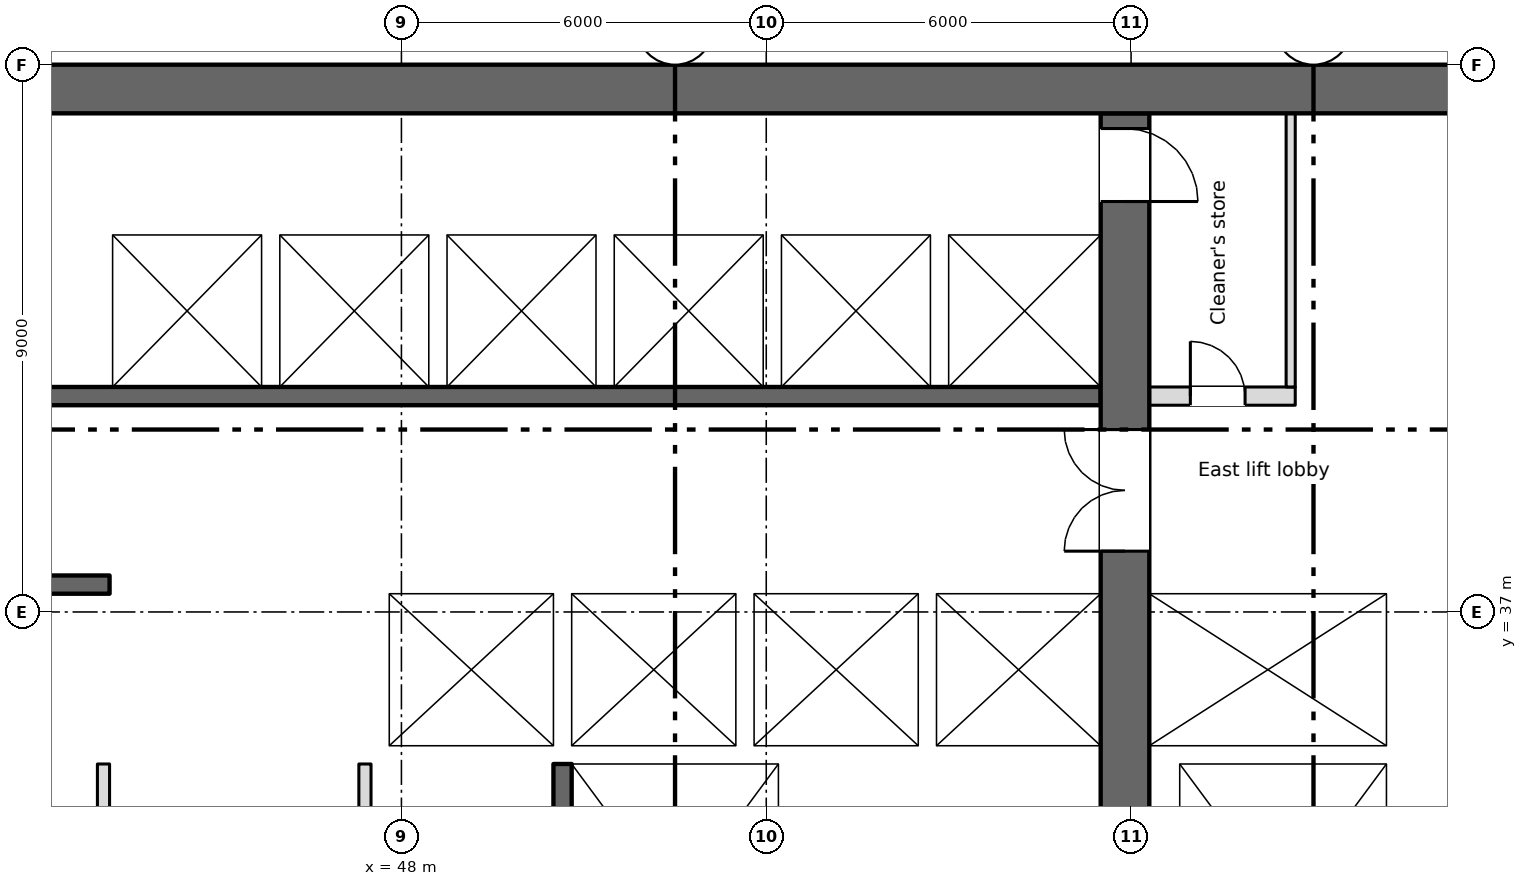
"""IFC4 building model, lengths in metres.
Left out: names, types, materials, properties, quantities, classifications, styles, units other than length and angle.
Written with IfcOpenShell. Run it as: python <this file> out.ifc"""

import sys

from ifc_helpers import new_model, si_unit, direction, frame, frame_2d, origin, place, context, subcontext, project, spatial, rectangle, extrude, element, fill, save


model = new_model("IFC4")
c1 = context("Model", 3, precision=1e-05, world=origin(), true_north=direction((0.0, 1.0)))
c2 = subcontext(c1, "Body", "Model", "MODEL_VIEW")
j1 = project(units=[si_unit("LENGTHUNIT", "METRE"), si_unit("PLANEANGLEUNIT", "RADIAN")], contexts=[c1])
p1 = place(None, origin())
s1 = spatial("IfcSite", under=j1, at=p1, CompositionType="ELEMENT")
p2 = place(p1, origin())
s2 = spatial("IfcBuilding", under=s1, at=p2, CompositionType="ELEMENT")
p3 = place(p2, frame((0.0, 0.0, 113.75)))
s3 = spatial("IfcBuildingStorey", under=s2, at=p3, CompositionType="ELEMENT", Elevation=113.75)
p4 = place(p3, frame((5.55, 45.6, 0.0), z_axis=(0.0, 0.0, 1.0), x_axis=(1.0, 0.0, 0.0)))
e1 = element("IfcWall", 1, at=p4, inside=s3, PredefinedType="SHEAR", context=c2, shape_type="SweptSolid", body=[
    extrude(rectangle(XDim=60.9, YDim=0.8, at=frame_2d((30.45, 0.0))), origin(), (0.0, 0.0, 1.0), 3.35),
])
p5 = place(p4, frame((1.2, 0.0, 0.6)))
e2 = element("IfcOpeningElement", 2, at=p5, cuts=e1, PredefinedType="OPENING", context=c2, shape_type="SweptSolid", body=[
    extrude(rectangle(XDim=0.6, YDim=2.4, at=frame_2d((0.3, 1.2))), frame((0.0, 0.41, 0.0), z_axis=(0.0, -1.0, 0.0), x_axis=(1.0, 0.0, 0.0)), (0.0, 0.0, 1.0), 0.82),
])
p6 = place(p4, frame((7.2, 0.0, 0.6)))
e3 = element("IfcOpeningElement", 3, at=p6, cuts=e1, PredefinedType="OPENING", context=c2, shape_type="SweptSolid", body=[
    extrude(rectangle(XDim=0.6, YDim=2.4, at=frame_2d((0.3, 1.2))), frame((0.0, 0.41, 0.0), z_axis=(0.0, -1.0, 0.0), x_axis=(1.0, 0.0, 0.0)), (0.0, 0.0, 1.0), 0.82),
])
p7 = place(p3, frame((64.35, 34.8, 0.0), z_axis=(0.0, 0.0, 1.0), x_axis=(0.0, 1.0, 0.0)))
e4 = element("IfcWall", 4, at=p7, inside=s3, PredefinedType="SHEAR", context=c2, shape_type="SweptSolid", body=[
    extrude(rectangle(XDim=10.4, YDim=0.3, at=frame_2d((5.2, 0.0))), origin(), (0.0, 0.0, 1.0), 3.35),
])
p8 = place(p3, frame((59.9, 28.4, 0.0), z_axis=(0.0, 0.0, 1.0), x_axis=(0.0, 1.0, 0.0)))
e5 = element("IfcWall", 5, at=p8, inside=s3, PredefinedType="SHEAR", context=c2, shape_type="SweptSolid", body=[
    extrude(rectangle(XDim=16.8, YDim=0.8, at=frame_2d((8.4, 0.0))), origin(), (0.0, 0.0, 1.0), 3.35),
])
p9 = place(p8, frame((9.6, 0.0, 0.0)))
e6 = element("IfcOpeningElement", 6, at=p9, cuts=e5, PredefinedType="OPENING", context=c2, shape_type="SweptSolid", body=[
    extrude(rectangle(XDim=2.0, YDim=2.1, at=frame_2d((1.0, 1.05))), frame((0.0, 0.41, 0.0), z_axis=(0.0, -1.0, 0.0), x_axis=(1.0, 0.0, 0.0)), (0.0, 0.0, 1.0), 0.82),
])
p10 = place(p8, frame((15.35, 0.0, 0.0)))
e7 = element("IfcOpeningElement", 7, at=p10, cuts=e5, PredefinedType="OPENING", context=c2, shape_type="SweptSolid", body=[
    extrude(rectangle(XDim=1.2, YDim=2.1, at=frame_2d((0.6, 1.05))), frame((0.0, 0.41, 0.0), z_axis=(0.0, -1.0, 0.0), x_axis=(1.0, 0.0, 0.0)), (0.0, 0.0, 1.0), 0.82),
])
p11 = place(p3, frame((50.65, 34.5, 0.0), z_axis=(0.0, 0.0, 1.0), x_axis=(0.0, -1.0, 0.0)))
e8 = element("IfcWall", 8, at=p11, inside=s3, PredefinedType="SHEAR", context=c2, shape_type="SweptSolid", body=[
    extrude(rectangle(XDim=6.1, YDim=0.3, at=frame_2d((3.05, 0.0))), origin(), (0.0, 0.0, 1.0), 3.35),
])
p12 = place(p11, frame((4.95, 0.0, 0.0)))
e9 = element("IfcOpeningElement", 9, at=p12, cuts=e8, PredefinedType="OPENING", context=c2, shape_type="SweptSolid", body=[
    extrude(rectangle(XDim=1.1, YDim=2.1, at=frame_2d((0.55, 1.05))), frame((0.0, 0.16, 0.0), z_axis=(0.0, -1.0, 0.0), x_axis=(1.0, 0.0, 0.0)), (0.0, 0.0, 1.0), 0.32),
])
p13 = place(p3, frame((54.35, 28.4, 0.0), z_axis=(0.0, 0.0, 1.0), x_axis=(0.0, 1.0, 0.0)))
e10 = element("IfcWall", 10, at=p13, inside=s3, PredefinedType="SHEAR", context=c2, shape_type="SweptSolid", body=[
    extrude(rectangle(XDim=6.1, YDim=0.3, at=frame_2d((3.05, 0.0))), origin(), (0.0, 0.0, 1.0), 3.35),
])
p14 = place(p3, frame((60.55, 28.4, 0.0), z_axis=(0.0, 0.0, 1.0), x_axis=(0.0, 1.0, 0.0)))
e11 = element("IfcWall", 11, at=p14, inside=s3, PredefinedType="SHEAR", context=c2, shape_type="SweptSolid", body=[
    extrude(rectangle(XDim=6.1, YDim=0.5, at=frame_2d((3.05, 0.0))), origin(), (0.0, 0.0, 1.0), 3.35),
])
p15 = place(p3, frame((64.35, 28.4, 0.0), z_axis=(0.0, 0.0, 1.0), x_axis=(0.0, 1.0, 0.0)))
e12 = element("IfcWall", 12, at=p15, inside=s3, PredefinedType="SHEAR", context=c2, shape_type="SweptSolid", body=[
    extrude(rectangle(XDim=6.1, YDim=0.3, at=frame_2d((3.05, 0.0))), origin(), (0.0, 0.0, 1.0), 3.35),
])
p16 = place(p3, frame((34.8, 34.65, 0.0), z_axis=(0.0, 0.0, 1.0), x_axis=(1.0, 0.0, 0.0)))
e13 = element("IfcWall", 13, at=p16, inside=s3, PredefinedType="SHEAR", context=c2, shape_type="SweptSolid", body=[
    extrude(rectangle(XDim=8.4, YDim=0.3, at=frame_2d((4.2, 0.0))), origin(), (0.0, 0.0, 1.0), 3.35),
])
p17 = place(p3, frame((47.3, 34.65, 0.0), z_axis=(0.0, 0.0, 1.0), x_axis=(1.0, 0.0, 0.0)))
e14 = element("IfcWall", 14, at=p17, inside=s3, PredefinedType="SHEAR", context=c2, shape_type="SweptSolid", body=[
    extrude(rectangle(XDim=12.2, YDim=0.3, at=frame_2d((6.1, 0.0))), origin(), (0.0, 0.0, 1.0), 3.35),
])
p18 = place(p17, frame((1.3, 0.0, 0.0)))
e15 = element("IfcOpeningElement", 15, at=p18, cuts=e14, PredefinedType="OPENING", context=c2, shape_type="SweptSolid", body=[
    extrude(rectangle(XDim=1.1, YDim=2.1, at=frame_2d((0.55, 1.05))), frame((0.0, 0.16, 0.0), z_axis=(0.0, -1.0, 0.0), x_axis=(1.0, 0.0, 0.0)), (0.0, 0.0, 1.0), 0.32),
])
p19 = place(p3, frame((60.3, 34.65, 0.0), z_axis=(0.0, 0.0, 1.0), x_axis=(1.0, 0.0, 0.0)))
e16 = element("IfcWall", 16, at=p19, inside=s3, PredefinedType="SHEAR", context=c2, shape_type="SweptSolid", body=[
    extrude(rectangle(XDim=4.2, YDim=0.3, at=frame_2d((2.1, 0.0))), origin(), (0.0, 0.0, 1.0), 3.35),
])
p20 = place(p3, frame((43.2, 37.45, 0.0), z_axis=(0.0, 0.0, 1.0), x_axis=(-1.0, 0.0, 0.0)))
e17 = element("IfcWall", 17, at=p20, inside=s3, PredefinedType="SHEAR", context=c2, shape_type="SweptSolid", body=[
    extrude(rectangle(XDim=8.4, YDim=0.3, at=frame_2d((4.2, 0.0))), origin(), (0.0, 0.0, 1.0), 3.35),
])
p21 = place(p20, frame((3.75, 0.0, 0.0)))
e18 = element("IfcOpeningElement", 18, at=p21, cuts=e17, PredefinedType="OPENING", context=c2, shape_type="SweptSolid", body=[
    extrude(rectangle(XDim=0.9, YDim=2.1, at=frame_2d((0.45, 1.05))), frame((0.0, 0.16, 0.0), z_axis=(0.0, -1.0, 0.0), x_axis=(1.0, 0.0, 0.0)), (0.0, 0.0, 1.0), 0.32),
])
p22 = place(p3, frame((47.3, 37.45, 0.0), z_axis=(0.0, 0.0, 1.0), x_axis=(1.0, 0.0, 0.0)))
e19 = element("IfcWall", 19, at=p22, inside=s3, PredefinedType="SHEAR", context=c2, shape_type="SweptSolid", body=[
    extrude(rectangle(XDim=12.2, YDim=0.3, at=frame_2d((6.1, 0.0))), origin(), (0.0, 0.0, 1.0), 3.35),
])
p23 = place(p22, frame((4.3, 0.0, 0.0)))
e20 = element("IfcOpeningElement", 20, at=p23, cuts=e19, PredefinedType="OPENING", context=c2, shape_type="SweptSolid", body=[
    extrude(rectangle(XDim=1.1, YDim=2.1, at=frame_2d((0.55, 1.05))), frame((0.0, 0.16, 0.0), z_axis=(0.0, -1.0, 0.0), x_axis=(1.0, 0.0, 0.0)), (0.0, 0.0, 1.0), 0.32),
])
p24 = place(p22, frame((7.3, 0.0, 0.0)))
e21 = element("IfcOpeningElement", 21, at=p24, cuts=e19, PredefinedType="OPENING", context=c2, shape_type="SweptSolid", body=[
    extrude(rectangle(XDim=1.1, YDim=2.1, at=frame_2d((0.55, 1.05))), frame((0.0, 0.16, 0.0), z_axis=(0.0, -1.0, 0.0), x_axis=(1.0, 0.0, 0.0)), (0.0, 0.0, 1.0), 0.32),
])
p25 = place(p22, frame((10.3, 0.0, 0.0)))
e22 = element("IfcOpeningElement", 22, at=p25, cuts=e19, PredefinedType="OPENING", context=c2, shape_type="SweptSolid", body=[
    extrude(rectangle(XDim=1.1, YDim=2.1, at=frame_2d((0.55, 1.05))), frame((0.0, 0.16, 0.0), z_axis=(0.0, -1.0, 0.0), x_axis=(1.0, 0.0, 0.0)), (0.0, 0.0, 1.0), 0.32),
])
p26 = place(p3, frame((60.3, 37.45, 0.0), z_axis=(0.0, 0.0, 1.0), x_axis=(1.0, 0.0, 0.0)))
e23 = element("IfcWall", 23, at=p26, inside=s3, PredefinedType="SHEAR", context=c2, shape_type="SweptSolid", body=[
    extrude(rectangle(XDim=3.9, YDim=0.3, at=frame_2d((1.95, 0.0))), origin(), (0.0, 0.0, 1.0), 3.35),
])
p27 = place(p26, frame((1.4, 0.0, 0.0)))
e24 = element("IfcOpeningElement", 24, at=p27, cuts=e23, PredefinedType="OPENING", context=c2, shape_type="SweptSolid", body=[
    extrude(rectangle(XDim=1.1, YDim=2.1, at=frame_2d((0.55, 1.05))), frame((0.0, 0.16, 0.0), z_axis=(0.0, -1.0, 0.0), x_axis=(1.0, 0.0, 0.0)), (0.0, 0.0, 1.0), 0.32),
])
p28 = place(p3, frame((43.05, 34.8, 0.0), z_axis=(0.0, 0.0, 1.0), x_axis=(0.0, 1.0, 0.0)))
e25 = element("IfcWall", 25, at=p28, inside=s3, PredefinedType="SHEAR", context=c2, shape_type="SweptSolid", body=[
    extrude(rectangle(XDim=2.5, YDim=0.3, at=frame_2d((1.25, 0.0))), origin(), (0.0, 0.0, 1.0), 3.35),
])
p29 = place(p3, frame((47.55, 34.8, 0.0), z_axis=(0.0, 0.0, 1.0), x_axis=(0.0, 1.0, 0.0)))
e26 = element("IfcWall", 26, at=p29, inside=s3, PredefinedType="SHEAR", context=c2, shape_type="SweptSolid", body=[
    extrude(rectangle(XDim=2.5, YDim=0.5, at=frame_2d((1.25, 0.0))), origin(), (0.0, 0.0, 1.0), 3.35),
])
p30 = place(p3, frame((50.65, 34.8, 0.0), z_axis=(0.0, 0.0, 1.0), x_axis=(0.0, 1.0, 0.0)))
e27 = element("IfcWall", 27, at=p30, inside=s3, PredefinedType="SHEAR", context=c2, shape_type="SweptSolid", body=[
    extrude(rectangle(XDim=2.5, YDim=0.3, at=frame_2d((1.25, 0.0))), origin(), (0.0, 0.0, 1.0), 3.35),
])
p31 = place(p3, frame((18.5, 40.55, 0.0), z_axis=(0.0, 0.0, 1.0), x_axis=(1.0, 0.0, 0.0)))
e28 = element("IfcWall", 28, at=p31, inside=s3, PredefinedType="SHEAR", context=c2, shape_type="SweptSolid", body=[
    extrude(rectangle(XDim=41.0, YDim=0.3, at=frame_2d((20.5, 0.0))), origin(), (0.0, 0.0, 1.0), 3.35),
])
p32 = place(p31, frame((15.9, 0.0, 0.0)))
e29 = element("IfcOpeningElement", 29, at=p32, cuts=e28, PredefinedType="OPENING", context=c2, shape_type="SweptSolid", body=[
    extrude(rectangle(XDim=0.9, YDim=2.1, at=frame_2d((0.45, 1.05))), frame((0.0, 0.16, 0.0), z_axis=(0.0, -1.0, 0.0), x_axis=(1.0, 0.0, 0.0)), (0.0, 0.0, 1.0), 0.32),
])
p33 = place(p31, frame((21.4, 0.0, 0.0)))
e30 = element("IfcOpeningElement", 30, at=p33, cuts=e28, PredefinedType="OPENING", context=c2, shape_type="SweptSolid", body=[
    extrude(rectangle(XDim=0.9, YDim=2.1, at=frame_2d((0.45, 1.05))), frame((0.0, 0.16, 0.0), z_axis=(0.0, -1.0, 0.0), x_axis=(1.0, 0.0, 0.0)), (0.0, 0.0, 1.0), 0.32),
])
p34 = place(p31, frame((6.175, 0.0, 0.0)))
e31 = element("IfcOpeningElement", 31, at=p34, cuts=e28, PredefinedType="OPENING", context=c2, shape_type="SweptSolid", body=[
    extrude(rectangle(XDim=1.1, YDim=2.1, at=frame_2d((0.55, 1.05))), frame((0.0, 0.16, 0.0), z_axis=(0.0, -1.0, 0.0), x_axis=(1.0, 0.0, 0.0)), (0.0, 0.0, 1.0), 0.32),
])
p35 = place(p31, frame((8.925, 0.0, 0.0)))
e32 = element("IfcOpeningElement", 32, at=p35, cuts=e28, PredefinedType="OPENING", context=c2, shape_type="SweptSolid", body=[
    extrude(rectangle(XDim=1.1, YDim=2.1, at=frame_2d((0.55, 1.05))), frame((0.0, 0.16, 0.0), z_axis=(0.0, -1.0, 0.0), x_axis=(1.0, 0.0, 0.0)), (0.0, 0.0, 1.0), 0.32),
])
p36 = place(p31, frame((11.675, 0.0, 0.0)))
e33 = element("IfcOpeningElement", 33, at=p36, cuts=e28, PredefinedType="OPENING", context=c2, shape_type="SweptSolid", body=[
    extrude(rectangle(XDim=1.1, YDim=2.1, at=frame_2d((0.55, 1.05))), frame((0.0, 0.16, 0.0), z_axis=(0.0, -1.0, 0.0), x_axis=(1.0, 0.0, 0.0)), (0.0, 0.0, 1.0), 0.32),
])
p37 = place(p31, frame((30.925, 0.0, 0.0)))
e34 = element("IfcOpeningElement", 34, at=p37, cuts=e28, PredefinedType="OPENING", context=c2, shape_type="SweptSolid", body=[
    extrude(rectangle(XDim=1.1, YDim=2.1, at=frame_2d((0.55, 1.05))), frame((0.0, 0.16, 0.0), z_axis=(0.0, -1.0, 0.0), x_axis=(1.0, 0.0, 0.0)), (0.0, 0.0, 1.0), 0.32),
])
p38 = place(p31, frame((33.675, 0.0, 0.0)))
e35 = element("IfcOpeningElement", 35, at=p38, cuts=e28, PredefinedType="OPENING", context=c2, shape_type="SweptSolid", body=[
    extrude(rectangle(XDim=1.1, YDim=2.1, at=frame_2d((0.55, 1.05))), frame((0.0, 0.16, 0.0), z_axis=(0.0, -1.0, 0.0), x_axis=(1.0, 0.0, 0.0)), (0.0, 0.0, 1.0), 0.32),
])
p39 = place(p31, frame((36.375, 0.0, 0.0)))
e36 = element("IfcOpeningElement", 36, at=p39, cuts=e28, PredefinedType="OPENING", context=c2, shape_type="SweptSolid", body=[
    extrude(rectangle(XDim=1.2, YDim=2.1, at=frame_2d((0.6, 1.05))), frame((0.0, 0.16, 0.0), z_axis=(0.0, -1.0, 0.0), x_axis=(1.0, 0.0, 0.0)), (0.0, 0.0, 1.0), 0.32),
])
p40 = place(p31, frame((39.15, 0.0, 0.0)))
e37 = element("IfcOpeningElement", 37, at=p40, cuts=e28, PredefinedType="OPENING", context=c2, shape_type="SweptSolid", body=[
    extrude(rectangle(XDim=1.2, YDim=2.1, at=frame_2d((0.6, 1.05))), frame((0.0, 0.16, 0.0), z_axis=(0.0, -1.0, 0.0), x_axis=(1.0, 0.0, 0.0)), (0.0, 0.0, 1.0), 0.32),
])
p41 = place(p3, frame((18.5, 43.35, 0.0), z_axis=(0.0, 0.0, 1.0), x_axis=(1.0, 0.0, 0.0)))
e38 = element("IfcWall", 38, at=p41, inside=s3, PredefinedType="SHEAR", context=c2, shape_type="SweptSolid", body=[
    extrude(rectangle(XDim=41.0, YDim=0.3, at=frame_2d((20.5, 0.0))), origin(), (0.0, 0.0, 1.0), 3.35),
])
p42 = place(p3, frame((60.3, 40.55, 0.0), z_axis=(0.0, 0.0, 1.0), x_axis=(1.0, 0.0, 0.0)))
e39 = element("IfcWall", 39, at=p42, inside=s3, PredefinedType="PARTITIONING", context=c2, shape_type="SweptSolid", body=[
    extrude(rectangle(XDim=2.4, YDim=0.3, at=frame_2d((1.2, 0.0))), origin(), (0.0, 0.0, 1.0), 3.35),
])
p43 = place(p42, frame((0.675, 0.0, 0.0)))
e40 = element("IfcOpeningElement", 40, at=p43, cuts=e39, PredefinedType="OPENING", context=c2, shape_type="SweptSolid", body=[
    extrude(rectangle(XDim=0.9, YDim=2.1, at=frame_2d((0.45, 1.05))), frame((0.0, 0.16, 0.0), z_axis=(0.0, -1.0, 0.0), x_axis=(1.0, 0.0, 0.0)), (0.0, 0.0, 1.0), 0.32),
])
for number, where, z_axis, x_axis in (
    (41, (53.65, 34.8, 0.0), (0.0, 0.0, 1.0), (0.0, 1.0, 0.0)),
    (42, (56.65, 34.8, 0.0), (0.0, 0.0, 1.0), (0.0, 1.0, 0.0)),
    (43, (43.1, 40.7, 0.0), (0.0, 0.0, 1.0), (0.0, 1.0, 0.0)),
    (44, (45.85, 40.7, 0.0), (0.0, 0.0, 1.0), (0.0, 1.0, 0.0)),
    (45, (48.6, 40.7, 0.0), (0.0, 0.0, 1.0), (0.0, 1.0, 0.0)),
    (46, (51.35, 40.7, 0.0), (0.0, 0.0, 1.0), (0.0, 1.0, 0.0)),
    (47, (54.1, 40.7, 0.0), (0.0, 0.0, 1.0), (0.0, 1.0, 0.0)),
    (48, (56.85, 40.7, 0.0), (0.0, 0.0, 1.0), (0.0, 1.0, 0.0)),
):
    element("IfcWall", number, at=place(p3, frame(where, z_axis=z_axis, x_axis=x_axis)), inside=s3, PredefinedType="SHEAR", context=c2, shape_type="SweptSolid", body=[
        extrude(rectangle(XDim=2.5, YDim=0.3, at=frame_2d((1.25, 0.0))), origin(), (0.0, 0.0, 1.0), 3.35),
    ])
for number, where, z_axis, x_axis in (
    (49, (43.1, 28.4, 0.0), (0.0, 0.0, 1.0), (0.0, 1.0, 0.0)),
    (50, (47.4, 28.4, 0.0), (0.0, 0.0, 1.0), (0.0, 1.0, 0.0)),
):
    element("IfcWall", number, at=place(p3, frame(where, z_axis=z_axis, x_axis=x_axis)), inside=s3, PredefinedType="PARTITIONING", context=c2, shape_type="SweptSolid", body=[
        extrude(rectangle(XDim=6.1, YDim=0.2, at=frame_2d((3.05, 0.0))), origin(), (0.0, 0.0, 1.0), 3.35),
    ])
p44 = place(p3, frame((62.625, 40.7, 0.0), z_axis=(0.0, 0.0, 1.0), x_axis=(0.0, 1.0, 0.0)))
e51 = element("IfcWall", 51, at=p44, inside=s3, PredefinedType="PARTITIONING", context=c2, shape_type="SweptSolid", body=[
    extrude(rectangle(XDim=4.5, YDim=0.15, at=frame_2d((2.25, 0.0))), origin(), (0.0, 0.0, 1.0), 3.35),
])
p45 = place(p43, origin())
e52 = element("IfcDoor", 52, at=p45, inside=s3, OperationType="SINGLE_SWING_LEFT", PredefinedType="DOOR", context=c2, shape_type="SweptSolid", body=[
    extrude(rectangle(XDim=0.9, YDim=2.1, at=frame_2d((0.45, 1.05))), frame((0.0, 0.025, 0.0), z_axis=(0.0, -1.0, 0.0), x_axis=(1.0, 0.0, 0.0)), (0.0, 0.0, 1.0), 0.05),
])
fill(e40, e52)
p46 = place(p23, origin())
e53 = element("IfcDoor", 53, at=p46, inside=s3, OperationType="SLIDING_TO_LEFT", PredefinedType="DOOR", context=c2, shape_type="SweptSolid", body=[
    extrude(rectangle(XDim=1.1, YDim=2.1, at=frame_2d((0.55, 1.05))), frame((0.0, 0.025, 0.0), z_axis=(0.0, -1.0, 0.0), x_axis=(1.0, 0.0, 0.0)), (0.0, 0.0, 1.0), 0.05),
])
fill(e20, e53)
p47 = place(p24, origin())
e54 = element("IfcDoor", 54, at=p47, inside=s3, OperationType="SLIDING_TO_LEFT", PredefinedType="DOOR", context=c2, shape_type="SweptSolid", body=[
    extrude(rectangle(XDim=1.1, YDim=2.1, at=frame_2d((0.55, 1.05))), frame((0.0, 0.025, 0.0), z_axis=(0.0, -1.0, 0.0), x_axis=(1.0, 0.0, 0.0)), (0.0, 0.0, 1.0), 0.05),
])
fill(e21, e54)
p48 = place(p25, origin())
e55 = element("IfcDoor", 55, at=p48, inside=s3, OperationType="SLIDING_TO_LEFT", PredefinedType="DOOR", context=c2, shape_type="SweptSolid", body=[
    extrude(rectangle(XDim=1.1, YDim=2.1, at=frame_2d((0.55, 1.05))), frame((0.0, 0.025, 0.0), z_axis=(0.0, -1.0, 0.0), x_axis=(1.0, 0.0, 0.0)), (0.0, 0.0, 1.0), 0.05),
])
fill(e22, e55)
p49 = place(p37, origin())
e56 = element("IfcDoor", 56, at=p49, inside=s3, OperationType="SLIDING_TO_LEFT", PredefinedType="DOOR", context=c2, shape_type="SweptSolid", body=[
    extrude(rectangle(XDim=1.1, YDim=2.1, at=frame_2d((0.55, 1.05))), frame((0.0, 0.025, 0.0), z_axis=(0.0, -1.0, 0.0), x_axis=(1.0, 0.0, 0.0)), (0.0, 0.0, 1.0), 0.05),
])
fill(e34, e56)
p50 = place(p38, origin())
e57 = element("IfcDoor", 57, at=p50, inside=s3, OperationType="SLIDING_TO_LEFT", PredefinedType="DOOR", context=c2, shape_type="SweptSolid", body=[
    extrude(rectangle(XDim=1.1, YDim=2.1, at=frame_2d((0.55, 1.05))), frame((0.0, 0.025, 0.0), z_axis=(0.0, -1.0, 0.0), x_axis=(1.0, 0.0, 0.0)), (0.0, 0.0, 1.0), 0.05),
])
fill(e35, e57)
p51 = place(p39, origin())
e58 = element("IfcDoor", 58, at=p51, inside=s3, OperationType="SLIDING_TO_LEFT", PredefinedType="DOOR", context=c2, shape_type="SweptSolid", body=[
    extrude(rectangle(XDim=1.2, YDim=2.1, at=frame_2d((0.6, 1.05))), frame((0.0, 0.025, 0.0), z_axis=(0.0, -1.0, 0.0), x_axis=(1.0, 0.0, 0.0)), (0.0, 0.0, 1.0), 0.05),
])
fill(e36, e58)
p52 = place(p40, origin())
e59 = element("IfcDoor", 59, at=p52, inside=s3, OperationType="SLIDING_TO_LEFT", PredefinedType="DOOR", context=c2, shape_type="SweptSolid", body=[
    extrude(rectangle(XDim=1.2, YDim=2.1, at=frame_2d((0.6, 1.05))), frame((0.0, 0.025, 0.0), z_axis=(0.0, -1.0, 0.0), x_axis=(1.0, 0.0, 0.0)), (0.0, 0.0, 1.0), 0.05),
])
fill(e37, e59)
p53 = place(p27, origin())
e60 = element("IfcDoor", 60, at=p53, inside=s3, OperationType="SLIDING_TO_LEFT", PredefinedType="DOOR", context=c2, shape_type="SweptSolid", body=[
    extrude(rectangle(XDim=1.1, YDim=2.1, at=frame_2d((0.55, 1.05))), frame((0.0, 0.025, 0.0), z_axis=(0.0, -1.0, 0.0), x_axis=(1.0, 0.0, 0.0)), (0.0, 0.0, 1.0), 0.05),
])
fill(e24, e60)
p54 = place(p18, origin())
e61 = element("IfcDoor", 61, at=p54, inside=s3, OperationType="SLIDING_TO_LEFT", PredefinedType="DOOR", context=c2, shape_type="SweptSolid", body=[
    extrude(rectangle(XDim=1.1, YDim=2.1, at=frame_2d((0.55, 1.05))), frame((0.0, 0.025, 0.0), z_axis=(0.0, -1.0, 0.0), x_axis=(1.0, 0.0, 0.0)), (0.0, 0.0, 1.0), 0.05),
])
fill(e15, e61)
p55 = place(p9, origin())
e62 = element("IfcDoor", 62, at=p55, inside=s3, OperationType="DOUBLE_DOOR_SINGLE_SWING", PredefinedType="DOOR", context=c2, shape_type="SweptSolid", body=[
    extrude(rectangle(XDim=2.0, YDim=2.1, at=frame_2d((1.0, 1.05))), frame((0.0, 0.025, 0.0), z_axis=(0.0, -1.0, 0.0), x_axis=(1.0, 0.0, 0.0)), (0.0, 0.0, 1.0), 0.05),
])
fill(e6, e62)
p56 = place(p10, origin())
e63 = element("IfcDoor", 63, at=p56, inside=s3, OperationType="SINGLE_SWING_LEFT", PredefinedType="DOOR", context=c2, shape_type="SweptSolid", body=[
    extrude(rectangle(XDim=1.2, YDim=2.1, at=frame_2d((0.6, 1.05))), frame((0.0, 0.025, 0.0), z_axis=(0.0, -1.0, 0.0), x_axis=(1.0, 0.0, 0.0)), (0.0, 0.0, 1.0), 0.05),
])
fill(e7, e63)
save(model, sys.argv[1])
